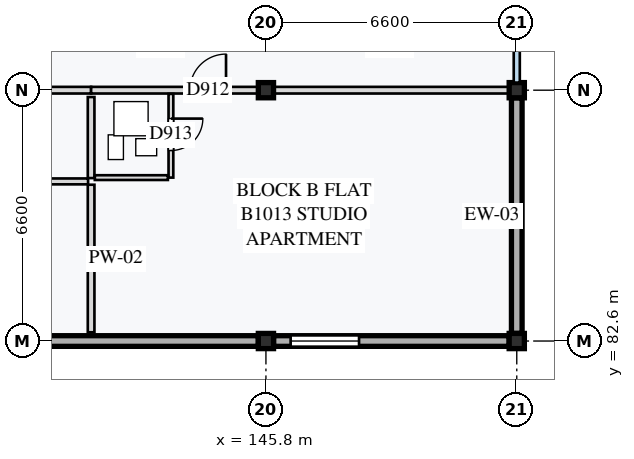
"""IFC4 building model, lengths in metres.
Left out: names, types, materials, properties, quantities, classifications, styles, units other than length and angle.
Written with IfcOpenShell. Run it as: python <this file> out.ifc"""

import sys

from ifc_helpers import new_model, si_unit, direction, frame, frame_2d, origin, origin_2d, place, context, subcontext, project, spatial, rectangle, extrude, element, fill, save


model = new_model("IFC4")
c1 = context("Model", 3, precision=1e-05, world=origin(), true_north=direction((0.0, 1.0)))
c2 = subcontext(c1, "Body", "Model", "MODEL_VIEW")
j1 = project(units=[si_unit("LENGTHUNIT", "METRE"), si_unit("PLANEANGLEUNIT", "RADIAN")], contexts=[c1])
p1 = place(None, origin())
s1 = spatial("IfcSite", under=j1, at=p1, CompositionType="ELEMENT")
p2 = place(p1, origin())
s2 = spatial("IfcBuilding", under=s1, at=p2, CompositionType="ELEMENT")
p3 = place(p2, frame((0.0, 0.0, 34.0)))
s3 = spatial("IfcBuildingStorey", under=s2, at=p3, CompositionType="ELEMENT", Elevation=34.0)
for number, where, z_axis, x_axis in (
    (1, (145.8, 82.6, 0.0), (0.0, 0.0, 1.0), (1.0, 0.0, 0.0)),
    (2, (145.8, 89.2, 0.0), (0.0, 0.0, 1.0), (1.0, 0.0, 0.0)),
    (3, (152.4, 82.6, 0.0), (0.0, 0.0, 1.0), (1.0, 0.0, 0.0)),
    (4, (152.4, 89.2, 0.0), (0.0, 0.0, 1.0), (1.0, 0.0, 0.0)),
):
    element("IfcColumn", number, at=place(p3, frame(where, z_axis=z_axis, x_axis=x_axis)), inside=s3, PredefinedType="COLUMN", context=c2, shape_type="SweptSolid", body=[
        extrude(rectangle(XDim=0.4, YDim=0.4, at=origin_2d()), origin(), (0.0, 0.0, 1.0), 3.2),
    ])
p4 = place(p3, frame((139.4, 82.6, 0.0), z_axis=(0.0, 0.0, 1.0), x_axis=(1.0, 0.0, 0.0)))
e5 = element("IfcWall", 5, at=p4, inside=s3, PredefinedType="STANDARD", context=c2, shape_type="SweptSolid", body=[
    extrude(rectangle(XDim=6.2, YDim=0.28, at=frame_2d((3.1, 0.0))), origin(), (0.0, 0.0, 1.0), 2.6),
])
p5 = place(p3, frame((146.0, 82.6, 0.0), z_axis=(0.0, 0.0, 1.0), x_axis=(1.0, 0.0, 0.0)))
e6 = element("IfcWall", 6, at=p5, inside=s3, PredefinedType="STANDARD", context=c2, shape_type="SweptSolid", body=[
    extrude(rectangle(XDim=6.2, YDim=0.28, at=frame_2d((3.1, 0.0))), origin(), (0.0, 0.0, 1.0), 2.6),
])
p6 = place(p5, frame((0.45, 0.0, 0.85)))
e7 = element("IfcOpeningElement", 7, at=p6, cuts=e6, PredefinedType="OPENING", context=c2, shape_type="SweptSolid", body=[
    extrude(rectangle(XDim=1.8, YDim=1.35, at=frame_2d((0.9, 0.675))), frame((0.0, 0.15, 0.0), z_axis=(0.0, -1.0, 0.0), x_axis=(1.0, 0.0, 0.0)), (0.0, 0.0, 1.0), 0.3),
])
p7 = place(p3, frame((152.4, 82.8, 0.0), z_axis=(0.0, 0.0, 1.0), x_axis=(0.0, 1.0, 0.0)))
e8 = element("IfcWall", 8, at=p7, inside=s3, PredefinedType="STANDARD", context=c2, shape_type="SweptSolid", body=[
    extrude(rectangle(XDim=6.2, YDim=0.28, at=frame_2d((3.1, 0.0))), origin(), (0.0, 0.0, 1.0), 2.65),
])
p8 = place(p3, frame((132.6, 89.2, 0.0), z_axis=(0.0, 0.0, 1.0), x_axis=(1.0, 0.0, 0.0)))
e9 = element("IfcWall", 9, at=p8, inside=s3, PredefinedType="PARTITIONING", context=c2, shape_type="SweptSolid", body=[
    extrude(rectangle(XDim=8.6, YDim=0.175, at=frame_2d((4.3, 0.0))), origin(), (0.0, 0.0, 1.0), 2.7),
])
p9 = place(p8, frame((3.725, 0.0, 0.0)))
e10 = element("IfcOpeningElement", 10, at=p9, cuts=e9, PredefinedType="OPENING", context=c2, shape_type="SweptSolid", body=[
    extrude(rectangle(XDim=0.95, YDim=2.16, at=frame_2d((0.475, 1.08))), frame((0.0, 0.097, 0.0), z_axis=(0.0, -1.0, 0.0), x_axis=(1.0, 0.0, 0.0)), (0.0, 0.0, 1.0), 0.195),
])
p10 = place(p3, frame((139.188, 86.8, 0.0), z_axis=(0.0, 0.0, 1.0), x_axis=(1.0, 0.0, 0.0)))
e11 = element("IfcWall", 11, at=p10, inside=s3, PredefinedType="PARTITIONING", context=c2, shape_type="SweptSolid", body=[
    extrude(rectangle(XDim=1.933, YDim=0.155, at=frame_2d((0.966, 0.0))), origin(), (0.0, 0.0, 1.0), 2.97),
])
p11 = place(p3, frame((141.2, 89.02, 0.0), z_axis=(0.0, 0.0, 1.0), x_axis=(0.0, -1.0, 0.0)))
e12 = element("IfcWall", 12, at=p11, inside=s3, PredefinedType="PARTITIONING", context=c2, shape_type="SweptSolid", body=[
    extrude(rectangle(XDim=2.133, YDim=0.175, at=frame_2d((1.066, 0.0))), origin(), (0.0, 0.0, 1.0), 2.97),
])
p12 = place(p3, frame((141.2, 86.712, 0.0), z_axis=(0.0, 0.0, 1.0), x_axis=(0.0, -1.0, 0.0)))
e13 = element("IfcWall", 13, at=p12, inside=s3, PredefinedType="PARTITIONING", context=c2, shape_type="SweptSolid", body=[
    extrude(rectangle(XDim=3.882, YDim=0.175, at=frame_2d((1.941, 0.0))), origin(), (0.0, 0.0, 1.0), 2.97),
])
p13 = place(p3, frame((141.2, 89.2, 0.0), z_axis=(0.0, 0.0, 1.0), x_axis=(1.0, 0.0, 0.0)))
e14 = element("IfcWall", 14, at=p13, inside=s3, PredefinedType="PARTITIONING", context=c2, shape_type="SweptSolid", body=[
    extrude(rectangle(XDim=11.2, YDim=0.175, at=frame_2d((5.6, 0.0))), origin(), (0.0, 0.0, 1.0), 2.7),
])
p14 = place(p13, frame((2.6, 0.0, 0.0)))
e15 = element("IfcOpeningElement", 15, at=p14, cuts=e14, PredefinedType="OPENING", context=c2, shape_type="SweptSolid", body=[
    extrude(rectangle(XDim=0.95, YDim=2.16, at=frame_2d((0.475, 1.08))), frame((0.0, 0.097, 0.0), z_axis=(0.0, -1.0, 0.0), x_axis=(1.0, 0.0, 0.0)), (0.0, 0.0, 1.0), 0.195),
])
p15 = place(p3, frame((143.3, 89.103, 0.0), z_axis=(0.0, 0.0, 1.0), x_axis=(0.0, -1.0, 0.0)))
e16 = element("IfcWall", 16, at=p15, inside=s3, PredefinedType="PARTITIONING", context=c2, shape_type="SweptSolid", body=[
    extrude(rectangle(XDim=2.203, YDim=0.125, at=frame_2d((1.101, 0.0))), origin(), (0.0, 0.0, 1.0), 2.97),
])
p16 = place(p15, frame((0.65, 0.0, 0.0)))
e17 = element("IfcOpeningElement", 17, at=p16, cuts=e16, PredefinedType="OPENING", context=c2, shape_type="SweptSolid", body=[
    extrude(rectangle(XDim=0.84, YDim=2.06, at=frame_2d((0.42, 1.03))), frame((0.0, 0.073, 0.0), z_axis=(0.0, -1.0, 0.0), x_axis=(1.0, 0.0, 0.0)), (0.0, 0.0, 1.0), 0.145),
])
p17 = place(p3, frame((141.298, 86.9, 0.0), z_axis=(0.0, 0.0, 1.0), x_axis=(1.0, 0.0, 0.0)))
e18 = element("IfcWall", 18, at=p17, inside=s3, PredefinedType="PARTITIONING", context=c2, shape_type="SweptSolid", body=[
    extrude(rectangle(XDim=1.922, YDim=0.125, at=frame_2d((0.961, 0.0))), origin(), (0.0, 0.0, 1.0), 2.97),
])
p18 = place(p6, origin())
e19 = element("IfcWindow", 19, at=p18, inside=s3, PartitioningType="SINGLE_PANEL", PredefinedType="WINDOW", context=c2, shape_type="SweptSolid", body=[
    extrude(rectangle(XDim=1.8, YDim=1.35, at=frame_2d((0.9, 0.675))), frame((0.0, 0.03, 0.0), z_axis=(0.0, -1.0, 0.0), x_axis=(1.0, 0.0, 0.0)), (0.0, 0.0, 1.0), 0.06),
])
fill(e7, e19)
p19 = place(p14, origin())
e20 = element("IfcDoor", 20, at=p19, inside=s3, OperationType="SINGLE_SWING_RIGHT", PredefinedType="DOOR", context=c2, shape_type="SweptSolid", body=[
    extrude(rectangle(XDim=0.95, YDim=2.16, at=frame_2d((0.475, 1.08))), frame((0.0, 0.025, 0.0), z_axis=(0.0, -1.0, 0.0), x_axis=(1.0, 0.0, 0.0)), (0.0, 0.0, 1.0), 0.05),
])
fill(e15, e20)
p20 = place(p16, origin())
e21 = element("IfcDoor", 21, at=p20, inside=s3, OperationType="SINGLE_SWING_LEFT", PredefinedType="DOOR", context=c2, shape_type="SweptSolid", body=[
    extrude(rectangle(XDim=0.84, YDim=2.06, at=frame_2d((0.42, 1.03))), frame((0.0, 0.025, 0.0), z_axis=(0.0, -1.0, 0.0), x_axis=(1.0, 0.0, 0.0)), (0.0, 0.0, 1.0), 0.05),
])
fill(e17, e21)
save(model, sys.argv[1])
